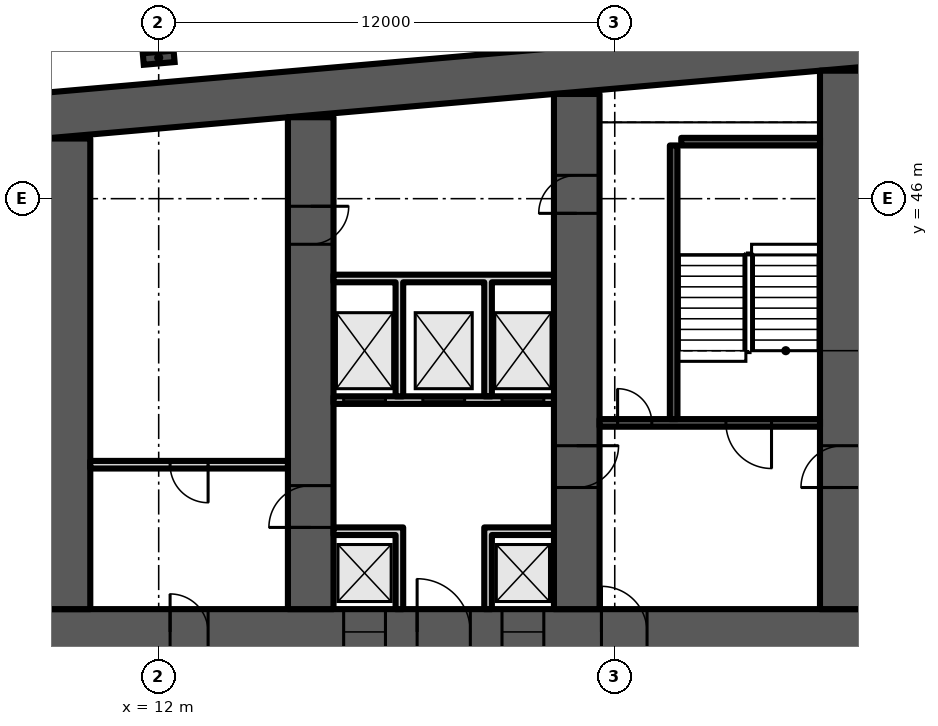
"""IFC4 building model, lengths in metres.
Left out: names, types, materials, properties, quantities, classifications, styles, units other than length and angle.
Written with IfcOpenShell. Run it as: python <this file> out.ifc"""

import sys

from ifc_helpers import new_model, si_unit, direction, frame, frame_2d, origin, origin_2d, place, context, subcontext, project, spatial, polyline, rectangle, i_section, outline, extrude, element, fill, save


model = new_model("IFC4")
c1 = context("Model", 3, precision=1e-05, world=origin(), true_north=direction((0.0, 1.0)))
c2 = subcontext(c1, "Body", "Model", "MODEL_VIEW")
j1 = project(units=[si_unit("LENGTHUNIT", "METRE"), si_unit("PLANEANGLEUNIT", "RADIAN")], contexts=[c1])
p1 = place(None, origin())
s1 = spatial("IfcSite", under=j1, at=p1, CompositionType="ELEMENT")
p2 = place(p1, origin())
s2 = spatial("IfcBuilding", under=s1, at=p2, CompositionType="ELEMENT")
p3 = place(p2, frame((0.0, 0.0, 41.5)))
s3 = spatial("IfcBuildingStorey", under=s2, at=p3, CompositionType="ELEMENT", Elevation=41.5)
p4 = place(p3, origin())
e1 = element("IfcWall", 1, at=p4, inside=s3, PredefinedType="SHEAR", context=c2, shape_type="SweptSolid", body=[
    extrude(outline(polyline([(9.0, 47.583), (37.0, 50.032), (65.0, 47.583), (65.0, 48.787), (37.0, 51.237), (9.0, 48.787), (9.0, 47.583)])), origin(), (0.0, 0.0, 1.0), 3.6),
])
p5 = place(p3, frame((9.0, 34.6, 0.0), z_axis=(0.0, 0.0, 1.0), x_axis=(1.0, 0.0, 0.0)))
e2 = element("IfcWall", 2, at=p5, inside=s3, PredefinedType="SHEAR", context=c2, shape_type="SweptSolid", body=[
    extrude(rectangle(XDim=56.0, YDim=1.2, at=frame_2d((28.0, 0.0))), origin(), (0.0, 0.0, 1.0), 3.6),
])
p6 = place(p5, frame((3.3, 0.0, 0.0)))
e3 = element("IfcOpeningElement", 3, at=p6, cuts=e2, PredefinedType="OPENING", context=c2, shape_type="SweptSolid", body=[
    extrude(rectangle(XDim=1.0, YDim=2.1, at=frame_2d((0.5, 1.05))), frame((0.0, 0.61, 0.0), z_axis=(0.0, -1.0, 0.0), x_axis=(1.0, 0.0, 0.0)), (0.0, 0.0, 1.0), 1.22),
])
p7 = place(p5, frame((7.867, 0.0, 0.0)))
e4 = element("IfcOpeningElement", 4, at=p7, cuts=e2, PredefinedType="OPENING", context=c2, shape_type="SweptSolid", body=[
    extrude(rectangle(XDim=1.1, YDim=2.1, at=frame_2d((0.55, 1.05))), frame((0.0, 0.61, 0.0), z_axis=(0.0, -1.0, 0.0), x_axis=(1.0, 0.0, 0.0)), (0.0, 0.0, 1.0), 1.22),
])
p8 = place(p5, frame((12.033, 0.0, 0.0)))
e5 = element("IfcOpeningElement", 5, at=p8, cuts=e2, PredefinedType="OPENING", context=c2, shape_type="SweptSolid", body=[
    extrude(rectangle(XDim=1.1, YDim=2.1, at=frame_2d((0.55, 1.05))), frame((0.0, 0.61, 0.0), z_axis=(0.0, -1.0, 0.0), x_axis=(1.0, 0.0, 0.0)), (0.0, 0.0, 1.0), 1.22),
])
p9 = place(p5, frame((9.8, 0.0, 0.0)))
e6 = element("IfcOpeningElement", 6, at=p9, cuts=e2, PredefinedType="OPENING", context=c2, shape_type="SweptSolid", body=[
    extrude(rectangle(XDim=1.4, YDim=2.1, at=frame_2d((0.7, 1.05))), frame((0.0, 0.61, 0.0), z_axis=(0.0, -1.0, 0.0), x_axis=(1.0, 0.0, 0.0)), (0.0, 0.0, 1.0), 1.22),
])
p10 = place(p5, frame((14.65, 0.0, 0.0)))
e7 = element("IfcOpeningElement", 7, at=p10, cuts=e2, PredefinedType="OPENING", context=c2, shape_type="SweptSolid", body=[
    extrude(rectangle(XDim=1.2, YDim=2.1, at=frame_2d((0.6, 1.05))), frame((0.0, 0.61, 0.0), z_axis=(0.0, -1.0, 0.0), x_axis=(1.0, 0.0, 0.0)), (0.0, 0.0, 1.0), 1.22),
])
p11 = place(p5, frame((21.867, 0.0, 0.0)))
e8 = element("IfcOpeningElement", 8, at=p11, cuts=e2, PredefinedType="OPENING", context=c2, shape_type="SweptSolid", body=[
    extrude(rectangle(XDim=1.1, YDim=2.1, at=frame_2d((0.55, 1.05))), frame((0.0, 0.61, 0.0), z_axis=(0.0, -1.0, 0.0), x_axis=(1.0, 0.0, 0.0)), (0.0, 0.0, 1.0), 1.22),
])
p12 = place(p5, frame((26.033, 0.0, 0.0)))
e9 = element("IfcOpeningElement", 9, at=p12, cuts=e2, PredefinedType="OPENING", context=c2, shape_type="SweptSolid", body=[
    extrude(rectangle(XDim=1.1, YDim=2.1, at=frame_2d((0.55, 1.05))), frame((0.0, 0.61, 0.0), z_axis=(0.0, -1.0, 0.0), x_axis=(1.0, 0.0, 0.0)), (0.0, 0.0, 1.0), 1.22),
])
p13 = place(p5, frame((23.8, 0.0, 0.0)))
e10 = element("IfcOpeningElement", 10, at=p13, cuts=e2, PredefinedType="OPENING", context=c2, shape_type="SweptSolid", body=[
    extrude(rectangle(XDim=1.4, YDim=2.1, at=frame_2d((0.7, 1.05))), frame((0.0, 0.61, 0.0), z_axis=(0.0, -1.0, 0.0), x_axis=(1.0, 0.0, 0.0)), (0.0, 0.0, 1.0), 1.22),
])
p14 = place(p5, frame((28.867, 0.0, 0.0)))
e11 = element("IfcOpeningElement", 11, at=p14, cuts=e2, PredefinedType="OPENING", context=c2, shape_type="SweptSolid", body=[
    extrude(rectangle(XDim=1.1, YDim=2.1, at=frame_2d((0.55, 1.05))), frame((0.0, 0.61, 0.0), z_axis=(0.0, -1.0, 0.0), x_axis=(1.0, 0.0, 0.0)), (0.0, 0.0, 1.0), 1.22),
])
p15 = place(p5, frame((33.033, 0.0, 0.0)))
e12 = element("IfcOpeningElement", 12, at=p15, cuts=e2, PredefinedType="OPENING", context=c2, shape_type="SweptSolid", body=[
    extrude(rectangle(XDim=1.1, YDim=2.1, at=frame_2d((0.55, 1.05))), frame((0.0, 0.61, 0.0), z_axis=(0.0, -1.0, 0.0), x_axis=(1.0, 0.0, 0.0)), (0.0, 0.0, 1.0), 1.22),
])
p16 = place(p5, frame((40.15, 0.0, 0.0)))
e13 = element("IfcOpeningElement", 13, at=p16, cuts=e2, PredefinedType="OPENING", context=c2, shape_type="SweptSolid", body=[
    extrude(rectangle(XDim=1.2, YDim=2.1, at=frame_2d((0.6, 1.05))), frame((0.0, 0.61, 0.0), z_axis=(0.0, -1.0, 0.0), x_axis=(1.0, 0.0, 0.0)), (0.0, 0.0, 1.0), 1.22),
])
p17 = place(p5, frame((44.8, 0.0, 0.0)))
e14 = element("IfcOpeningElement", 14, at=p17, cuts=e2, PredefinedType="OPENING", context=c2, shape_type="SweptSolid", body=[
    extrude(rectangle(XDim=1.4, YDim=2.1, at=frame_2d((0.7, 1.05))), frame((0.0, 0.61, 0.0), z_axis=(0.0, -1.0, 0.0), x_axis=(1.0, 0.0, 0.0)), (0.0, 0.0, 1.0), 1.22),
])
p18 = place(p5, frame((49.867, 0.0, 0.0)))
e15 = element("IfcOpeningElement", 15, at=p18, cuts=e2, PredefinedType="OPENING", context=c2, shape_type="SweptSolid", body=[
    extrude(rectangle(XDim=1.1, YDim=2.1, at=frame_2d((0.55, 1.05))), frame((0.0, 0.61, 0.0), z_axis=(0.0, -1.0, 0.0), x_axis=(1.0, 0.0, 0.0)), (0.0, 0.0, 1.0), 1.22),
])
p19 = place(p5, frame((53.5, 0.0, 0.0)))
e16 = element("IfcOpeningElement", 16, at=p19, cuts=e2, PredefinedType="OPENING", context=c2, shape_type="SweptSolid", body=[
    extrude(rectangle(XDim=1.1, YDim=2.1, at=frame_2d((0.55, 1.05))), frame((0.0, 0.61, 0.0), z_axis=(0.0, -1.0, 0.0), x_axis=(1.0, 0.0, 0.0)), (0.0, 0.0, 1.0), 1.22),
])
p20 = place(p5, frame((51.567, 0.0, 0.0)))
e17 = element("IfcOpeningElement", 17, at=p20, cuts=e2, PredefinedType="OPENING", context=c2, shape_type="SweptSolid", body=[
    extrude(rectangle(XDim=1.4, YDim=2.1, at=frame_2d((0.7, 1.05))), frame((0.0, 0.61, 0.0), z_axis=(0.0, -1.0, 0.0), x_axis=(1.0, 0.0, 0.0)), (0.0, 0.0, 1.0), 1.22),
])
p21 = place(p3, frame((9.6, 35.2, 0.0), z_axis=(0.0, 0.0, 1.0), x_axis=(0.0, 1.0, 0.0)))
e18 = element("IfcWall", 18, at=p21, inside=s3, PredefinedType="SHEAR", context=c2, shape_type="SweptSolid", body=[
    extrude(rectangle(XDim=12.383, YDim=1.2, at=frame_2d((6.191, 0.0))), origin(), (0.0, 0.0, 1.0), 3.6),
])
p22 = place(p3, frame((16.0, 35.2, 0.0), z_axis=(0.0, 0.0, 1.0), x_axis=(0.0, 1.0, 0.0)))
e19 = element("IfcWall", 19, at=p22, inside=s3, PredefinedType="SHEAR", context=c2, shape_type="SweptSolid", body=[
    extrude(rectangle(XDim=12.943, YDim=1.2, at=frame_2d((6.471, 0.0))), origin(), (0.0, 0.0, 1.0), 3.6),
])
p23 = place(p22, frame((2.15, 0.0, 0.0)))
e20 = element("IfcOpeningElement", 20, at=p23, cuts=e19, PredefinedType="OPENING", context=c2, shape_type="SweptSolid", body=[
    extrude(rectangle(XDim=1.1, YDim=2.1, at=frame_2d((0.55, 1.05))), frame((0.0, 0.61, 0.0), z_axis=(0.0, -1.0, 0.0), x_axis=(1.0, 0.0, 0.0)), (0.0, 0.0, 1.0), 1.22),
])
p24 = place(p22, frame((9.6, 0.0, 0.0)))
e21 = element("IfcOpeningElement", 21, at=p24, cuts=e19, PredefinedType="OPENING", context=c2, shape_type="SweptSolid", body=[
    extrude(rectangle(XDim=1.0, YDim=2.1, at=frame_2d((0.5, 1.05))), frame((0.0, 0.61, 0.0), z_axis=(0.0, -1.0, 0.0), x_axis=(1.0, 0.0, 0.0)), (0.0, 0.0, 1.0), 1.22),
])
p25 = place(p3, frame((23.0, 35.2, 0.0), z_axis=(0.0, 0.0, 1.0), x_axis=(0.0, 1.0, 0.0)))
e22 = element("IfcWall", 22, at=p25, inside=s3, PredefinedType="SHEAR", context=c2, shape_type="SweptSolid", body=[
    extrude(rectangle(XDim=13.555, YDim=1.2, at=frame_2d((6.778, 0.0))), origin(), (0.0, 0.0, 1.0), 3.6),
])
p26 = place(p25, frame((10.414, 0.0, 0.0)))
e23 = element("IfcOpeningElement", 23, at=p26, cuts=e22, PredefinedType="OPENING", context=c2, shape_type="SweptSolid", body=[
    extrude(rectangle(XDim=1.0, YDim=2.1, at=frame_2d((0.5, 1.05))), frame((0.0, 0.61, 0.0), z_axis=(0.0, -1.0, 0.0), x_axis=(1.0, 0.0, 0.0)), (0.0, 0.0, 1.0), 1.22),
])
p27 = place(p25, frame((3.2, 0.0, 0.0)))
e24 = element("IfcOpeningElement", 24, at=p27, cuts=e22, PredefinedType="OPENING", context=c2, shape_type="SweptSolid", body=[
    extrude(rectangle(XDim=1.1, YDim=2.1, at=frame_2d((0.55, 1.05))), frame((0.0, 0.61, 0.0), z_axis=(0.0, -1.0, 0.0), x_axis=(1.0, 0.0, 0.0)), (0.0, 0.0, 1.0), 1.22),
])
p28 = place(p3, frame((30.0, 35.2, 0.0), z_axis=(0.0, 0.0, 1.0), x_axis=(0.0, 1.0, 0.0)))
e25 = element("IfcWall", 25, at=p28, inside=s3, PredefinedType="SHEAR", context=c2, shape_type="SweptSolid", body=[
    extrude(rectangle(XDim=14.168, YDim=1.2, at=frame_2d((7.084, 0.0))), origin(), (0.0, 0.0, 1.0), 3.6),
])
p29 = place(p28, frame((3.2, 0.0, 0.0)))
e26 = element("IfcOpeningElement", 26, at=p29, cuts=e25, PredefinedType="OPENING", context=c2, shape_type="SweptSolid", body=[
    extrude(rectangle(XDim=1.1, YDim=2.1, at=frame_2d((0.55, 1.05))), frame((0.0, 0.61, 0.0), z_axis=(0.0, -1.0, 0.0), x_axis=(1.0, 0.0, 0.0)), (0.0, 0.0, 1.0), 1.22),
])
p30 = place(p3, frame((12.0, 49.71, 0.0), z_axis=(0.0, 0.0, 1.0), x_axis=(-0.087156, 0.996197, 0.0)))
e27 = element("IfcColumn", 27, at=p30, inside=s3, PredefinedType="COLUMN", context=c2, shape_type="SweptSolid", body=[
    extrude(i_section(OverallWidth=0.303, OverallDepth=0.814, WebThickness=0.021, FlangeThickness=0.04, FilletRadius=0.03, at=origin_2d()), origin(), (0.0, 0.0, 1.0), 3.6),
])
p31 = place(p3, frame((10.2, 39.0, 0.0), z_axis=(0.0, 0.0, 1.0), x_axis=(1.0, 0.0, 0.0)))
e28 = element("IfcWall", 28, at=p31, inside=s3, PredefinedType="PARTITIONING", context=c2, shape_type="SweptSolid", body=[
    extrude(rectangle(XDim=5.2, YDim=0.2, at=frame_2d((2.6, 0.0))), origin(), (0.0, 0.0, 1.0), 3.2),
])
p32 = place(p31, frame((2.1, 0.0, 0.0)))
e29 = element("IfcOpeningElement", 29, at=p32, cuts=e28, PredefinedType="OPENING", context=c2, shape_type="SweptSolid", body=[
    extrude(rectangle(XDim=1.0, YDim=2.1, at=frame_2d((0.5, 1.05))), frame((0.0, 0.11, 0.0), z_axis=(0.0, -1.0, 0.0), x_axis=(1.0, 0.0, 0.0)), (0.0, 0.0, 1.0), 0.22),
])
p33 = place(p3, frame((16.6, 40.7, 0.0), z_axis=(0.0, 0.0, 1.0), x_axis=(1.0, 0.0, 0.0)))
e30 = element("IfcWall", 30, at=p33, inside=s3, PredefinedType="PARTITIONING", context=c2, shape_type="SweptSolid", body=[
    extrude(rectangle(XDim=5.8, YDim=0.2, at=frame_2d((2.9, 0.0))), origin(), (0.0, 0.0, 1.0), 3.2),
])
p34 = place(p33, frame((0.267, 0.0, 0.0)))
e31 = element("IfcOpeningElement", 31, at=p34, cuts=e30, PredefinedType="OPENING", context=c2, shape_type="SweptSolid", body=[
    extrude(rectangle(XDim=1.1, YDim=2.1, at=frame_2d((0.55, 1.05))), frame((0.0, 0.11, 0.0), z_axis=(0.0, -1.0, 0.0), x_axis=(1.0, 0.0, 0.0)), (0.0, 0.0, 1.0), 0.22),
])
p35 = place(p33, frame((2.35, 0.0, 0.0)))
e32 = element("IfcOpeningElement", 32, at=p35, cuts=e30, PredefinedType="OPENING", context=c2, shape_type="SweptSolid", body=[
    extrude(rectangle(XDim=1.1, YDim=2.1, at=frame_2d((0.55, 1.05))), frame((0.0, 0.11, 0.0), z_axis=(0.0, -1.0, 0.0), x_axis=(1.0, 0.0, 0.0)), (0.0, 0.0, 1.0), 0.22),
])
p36 = place(p33, frame((4.433, 0.0, 0.0)))
e33 = element("IfcOpeningElement", 33, at=p36, cuts=e30, PredefinedType="OPENING", context=c2, shape_type="SweptSolid", body=[
    extrude(rectangle(XDim=1.1, YDim=2.1, at=frame_2d((0.55, 1.05))), frame((0.0, 0.11, 0.0), z_axis=(0.0, -1.0, 0.0), x_axis=(1.0, 0.0, 0.0)), (0.0, 0.0, 1.0), 0.22),
])
p37 = place(p3, frame((0.0, 0.0, -0.0)))
e34 = element("IfcWall", 34, at=p37, inside=s3, PredefinedType="PARTITIONING", context=c2, shape_type="SweptSolid", body=[
    extrude(outline(polyline([(18.233, 37.15), (16.6, 37.15), (16.6, 37.35), (18.233, 37.35), (18.433, 37.35), (18.433, 35.2), (18.233, 35.2), (18.233, 37.15)])), origin(), (0.0, 0.0, 1.0), 3.2),
])
p38 = place(p3, frame((0.0, 0.0, -0.0)))
e35 = element("IfcWall", 35, at=p38, inside=s3, PredefinedType="PARTITIONING", context=c2, shape_type="SweptSolid", body=[
    extrude(outline(polyline([(20.567, 37.35), (20.767, 37.35), (22.4, 37.35), (22.4, 37.15), (20.767, 37.15), (20.767, 35.2), (20.567, 35.2), (20.567, 37.35)])), origin(), (0.0, 0.0, 1.0), 3.2),
])
p39 = place(p3, frame((0.0, 0.0, -0.0)))
e36 = element("IfcWall", 36, at=p39, inside=s3, PredefinedType="PARTITIONING", context=c2, shape_type="SweptSolid", body=[
    extrude(outline(polyline([(18.433, 40.8), (18.233, 40.8), (18.233, 43.8), (16.6, 43.8), (16.6, 44.0), (22.4, 44.0), (22.4, 43.8), (20.767, 43.8), (20.767, 40.8), (20.567, 40.8), (20.567, 43.8), (18.433, 43.8), (18.433, 40.8)])), origin(), (0.0, 0.0, 1.0), 3.2),
])
p40 = place(p3, frame((23.6, 40.1, 0.0), z_axis=(0.0, 0.0, 1.0), x_axis=(1.0, 0.0, 0.0)))
e37 = element("IfcWall", 37, at=p40, inside=s3, PredefinedType="SHEAR", context=c2, shape_type="SweptSolid", body=[
    extrude(rectangle(XDim=5.8, YDim=0.2, at=frame_2d((2.9, 0.0))), origin(), (0.0, 0.0, 1.0), 3.2),
])
p41 = place(p40, frame((3.325, 0.0, 0.0)))
e38 = element("IfcOpeningElement", 38, at=p41, cuts=e37, PredefinedType="OPENING", context=c2, shape_type="SweptSolid", body=[
    extrude(rectangle(XDim=1.2, YDim=2.1, at=frame_2d((0.6, 1.05))), frame((0.0, 0.11, 0.0), z_axis=(0.0, -1.0, 0.0), x_axis=(1.0, 0.0, 0.0)), (0.0, 0.0, 1.0), 0.22),
])
p42 = place(p40, frame((0.475, 0.0, 0.0)))
e39 = element("IfcOpeningElement", 39, at=p42, cuts=e37, PredefinedType="OPENING", context=c2, shape_type="SweptSolid", body=[
    extrude(rectangle(XDim=0.9, YDim=2.1, at=frame_2d((0.45, 1.05))), frame((0.0, 0.11, 0.0), z_axis=(0.0, -1.0, 0.0), x_axis=(1.0, 0.0, 0.0)), (0.0, 0.0, 1.0), 0.22),
])
p43 = place(p3, frame((25.55, 40.2, 0.0), z_axis=(0.0, 0.0, 1.0), x_axis=(0.0, 1.0, 0.0)))
e40 = element("IfcWall", 40, at=p43, inside=s3, PredefinedType="SHEAR", context=c2, shape_type="SweptSolid", body=[
    extrude(rectangle(XDim=7.2, YDim=0.2, at=frame_2d((3.6, 0.0))), origin(), (0.0, 0.0, 1.0), 3.2),
])
p44 = place(p3, frame((25.75, 47.5, 0.0), z_axis=(0.0, 0.0, 1.0), x_axis=(1.0, 0.0, 0.0)))
e41 = element("IfcWall", 41, at=p44, inside=s3, PredefinedType="SHEAR", context=c2, shape_type="SweptSolid", body=[
    extrude(rectangle(XDim=3.65, YDim=0.2, at=frame_2d((1.825, 0.0))), origin(), (0.0, 0.0, 1.0), 3.2),
])
p45 = place(p6, origin())
e42 = element("IfcDoor", 42, at=p45, inside=s3, OperationType="SINGLE_SWING_LEFT", PredefinedType="DOOR", context=c2, shape_type="SweptSolid", body=[
    extrude(rectangle(XDim=1.0, YDim=2.1, at=frame_2d((0.5, 1.05))), frame((0.0, 0.6, 0.0), z_axis=(0.0, -1.0, 0.0), x_axis=(1.0, 0.0, 0.0)), (0.0, 0.0, 1.0), 1.199),
])
fill(e3, e42)
p46 = place(p32, origin())
e43 = element("IfcDoor", 43, at=p46, inside=s3, OperationType="SINGLE_SWING_RIGHT", PredefinedType="DOOR", context=c2, shape_type="SweptSolid", body=[
    extrude(rectangle(XDim=1.0, YDim=2.1, at=frame_2d((0.5, 1.05))), frame((0.0, 0.025, 0.0), z_axis=(0.0, -1.0, 0.0), x_axis=(1.0, 0.0, 0.0)), (0.0, 0.0, 1.0), 0.05),
])
fill(e29, e43)
p47 = place(p7, origin())
e44 = element("IfcDoor", 44, at=p47, inside=s3, OperationType="DOUBLE_DOOR_SLIDING", PredefinedType="DOOR", context=c2, shape_type="SweptSolid", body=[
    extrude(rectangle(XDim=1.1, YDim=2.1, at=frame_2d((0.55, 1.05))), frame((0.0, 0.025, 0.0), z_axis=(0.0, -1.0, 0.0), x_axis=(1.0, 0.0, 0.0)), (0.0, 0.0, 1.0), 0.05),
])
fill(e4, e44)
p48 = place(p8, origin())
e45 = element("IfcDoor", 45, at=p48, inside=s3, OperationType="DOUBLE_DOOR_SLIDING", PredefinedType="DOOR", context=c2, shape_type="SweptSolid", body=[
    extrude(rectangle(XDim=1.1, YDim=2.1, at=frame_2d((0.55, 1.05))), frame((0.0, 0.025, 0.0), z_axis=(0.0, -1.0, 0.0), x_axis=(1.0, 0.0, 0.0)), (0.0, 0.0, 1.0), 0.05),
])
fill(e5, e45)
p49 = place(p9, origin())
e46 = element("IfcDoor", 46, at=p49, inside=s3, OperationType="DOUBLE_DOOR_SINGLE_SWING", PredefinedType="DOOR", context=c2, shape_type="SweptSolid", body=[
    extrude(rectangle(XDim=1.4, YDim=2.1, at=frame_2d((0.7, 1.05))), frame((0.0, 0.025, 0.0), z_axis=(0.0, -1.0, 0.0), x_axis=(1.0, 0.0, 0.0)), (0.0, 0.0, 1.0), 0.05),
])
fill(e6, e46)
p50 = place(p34, origin())
e47 = element("IfcDoor", 47, at=p50, inside=s3, OperationType="DOUBLE_DOOR_SLIDING", PredefinedType="DOOR", context=c2, shape_type="SweptSolid", body=[
    extrude(rectangle(XDim=1.1, YDim=2.1, at=frame_2d((0.55, 1.05))), frame((0.0, 0.025, 0.0), z_axis=(0.0, -1.0, 0.0), x_axis=(1.0, 0.0, 0.0)), (0.0, 0.0, 1.0), 0.05),
])
fill(e31, e47)
p51 = place(p35, origin())
e48 = element("IfcDoor", 48, at=p51, inside=s3, OperationType="DOUBLE_DOOR_SLIDING", PredefinedType="DOOR", context=c2, shape_type="SweptSolid", body=[
    extrude(rectangle(XDim=1.1, YDim=2.1, at=frame_2d((0.55, 1.05))), frame((0.0, 0.025, 0.0), z_axis=(0.0, -1.0, 0.0), x_axis=(1.0, 0.0, 0.0)), (0.0, 0.0, 1.0), 0.05),
])
fill(e32, e48)
p52 = place(p36, origin())
e49 = element("IfcDoor", 49, at=p52, inside=s3, OperationType="DOUBLE_DOOR_SLIDING", PredefinedType="DOOR", context=c2, shape_type="SweptSolid", body=[
    extrude(rectangle(XDim=1.1, YDim=2.1, at=frame_2d((0.55, 1.05))), frame((0.0, 0.025, 0.0), z_axis=(0.0, -1.0, 0.0), x_axis=(1.0, 0.0, 0.0)), (0.0, 0.0, 1.0), 0.05),
])
fill(e33, e49)
p53 = place(p26, origin())
e50 = element("IfcDoor", 50, at=p53, inside=s3, OperationType="SINGLE_SWING_LEFT", PredefinedType="DOOR", context=c2, shape_type="SweptSolid", body=[
    extrude(rectangle(XDim=1.0, YDim=2.1, at=frame_2d((0.5, 1.05))), frame((0.0, 0.6, 0.0), z_axis=(0.0, -1.0, 0.0), x_axis=(1.0, 0.0, 0.0)), (0.0, 0.0, 1.0), 1.199),
])
fill(e23, e50)
p54 = place(p41, origin())
e51 = element("IfcDoor", 51, at=p54, inside=s3, OperationType="SINGLE_SWING_RIGHT", PredefinedType="DOOR", context=c2, shape_type="SweptSolid", body=[
    extrude(rectangle(XDim=1.2, YDim=2.1, at=frame_2d((0.6, 1.05))), frame((0.0, 0.025, 0.0), z_axis=(0.0, -1.0, 0.0), x_axis=(1.0, 0.0, 0.0)), (0.0, 0.0, 1.0), 0.05),
])
fill(e38, e51)
p55 = place(p42, origin())
e52 = element("IfcDoor", 52, at=p55, inside=s3, OperationType="SINGLE_SWING_LEFT", PredefinedType="DOOR", context=c2, shape_type="SweptSolid", body=[
    extrude(rectangle(XDim=0.9, YDim=2.1, at=frame_2d((0.45, 1.05))), frame((0.0, 0.025, 0.0), z_axis=(0.0, -1.0, 0.0), x_axis=(1.0, 0.0, 0.0)), (0.0, 0.0, 1.0), 0.05),
])
fill(e39, e52)
p56 = place(p10, origin())
e53 = element("IfcDoor", 53, at=p56, inside=s3, OperationType="SINGLE_SWING_LEFT", PredefinedType="DOOR", context=c2, shape_type="SweptSolid", body=[
    extrude(rectangle(XDim=1.2, YDim=2.1, at=frame_2d((0.6, 1.05))), frame((0.0, 0.025, 0.0), z_axis=(0.0, -1.0, 0.0), x_axis=(1.0, 0.0, 0.0)), (0.0, 0.0, 1.0), 0.05),
])
fill(e7, e53)
p57 = place(p23, origin())
e54 = element("IfcDoor", 54, at=p57, inside=s3, OperationType="SINGLE_SWING_LEFT", PredefinedType="DOOR", context=c2, shape_type="SweptSolid", body=[
    extrude(rectangle(XDim=1.1, YDim=2.1, at=frame_2d((0.55, 1.05))), frame((0.0, 0.025, 0.0), z_axis=(0.0, -1.0, 0.0), x_axis=(1.0, 0.0, 0.0)), (0.0, 0.0, 1.0), 0.05),
])
fill(e20, e54)
p58 = place(p24, origin())
e55 = element("IfcDoor", 55, at=p58, inside=s3, OperationType="SINGLE_SWING_RIGHT", PredefinedType="DOOR", context=c2, shape_type="SweptSolid", body=[
    extrude(rectangle(XDim=1.0, YDim=2.1, at=frame_2d((0.5, 1.05))), frame((0.0, 0.6, 0.0), z_axis=(0.0, -1.0, 0.0), x_axis=(1.0, 0.0, 0.0)), (0.0, 0.0, 1.0), 1.199),
])
fill(e21, e55)
p59 = place(p27, origin())
e56 = element("IfcDoor", 56, at=p59, inside=s3, OperationType="SINGLE_SWING_RIGHT", PredefinedType="DOOR", context=c2, shape_type="SweptSolid", body=[
    extrude(rectangle(XDim=1.1, YDim=2.1, at=frame_2d((0.55, 1.05))), frame((0.0, 0.025, 0.0), z_axis=(0.0, -1.0, 0.0), x_axis=(1.0, 0.0, 0.0)), (0.0, 0.0, 1.0), 0.05),
])
fill(e24, e56)
p60 = place(p29, origin())
e57 = element("IfcDoor", 57, at=p60, inside=s3, OperationType="SINGLE_SWING_LEFT", PredefinedType="DOOR", context=c2, shape_type="SweptSolid", body=[
    extrude(rectangle(XDim=1.1, YDim=2.1, at=frame_2d((0.55, 1.05))), frame((0.0, 0.025, 0.0), z_axis=(0.0, -1.0, 0.0), x_axis=(1.0, 0.0, 0.0)), (0.0, 0.0, 1.0), 0.05),
])
fill(e26, e57)
save(model, sys.argv[1])
